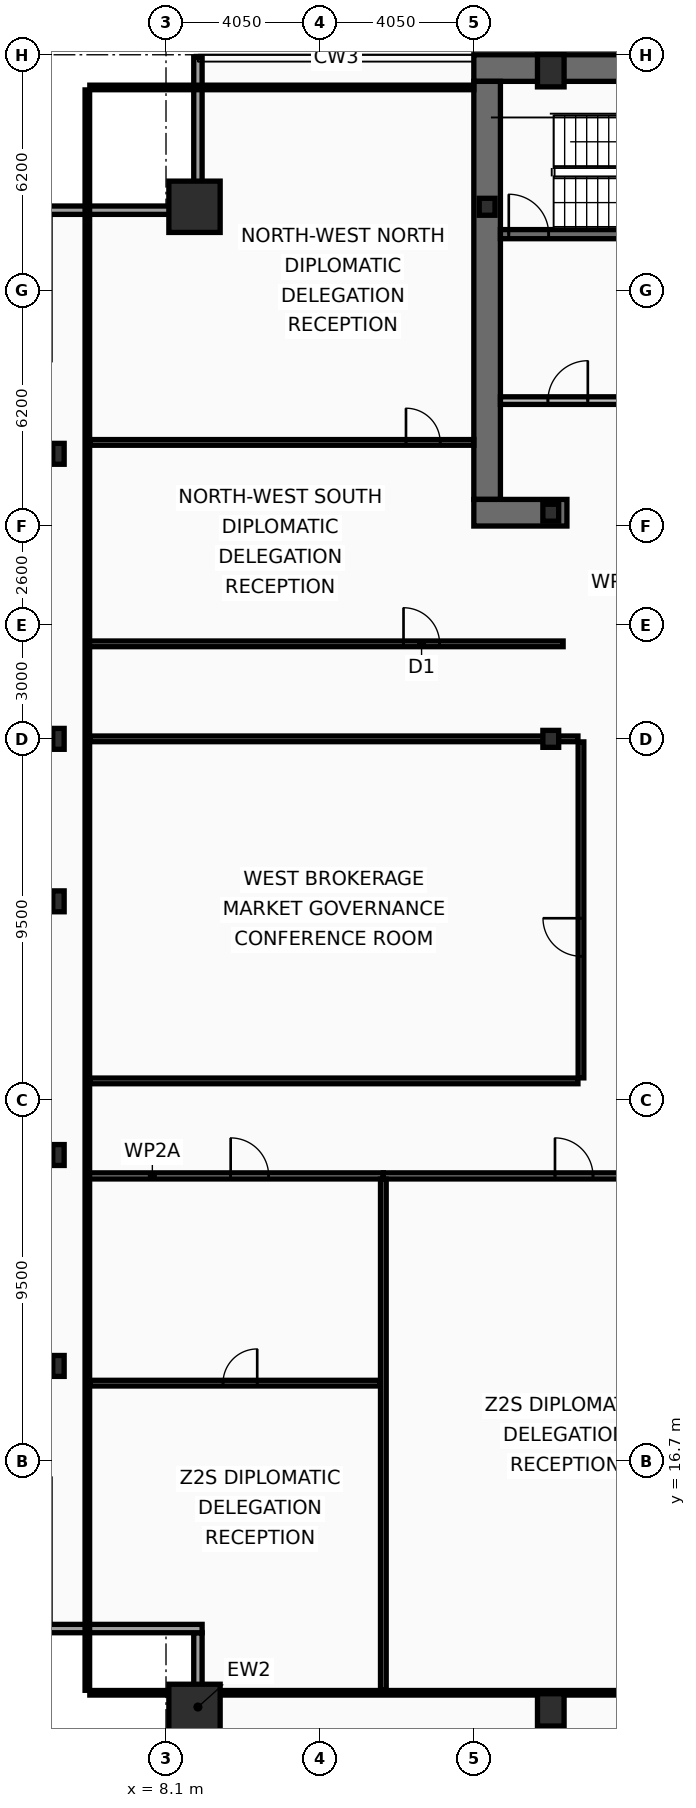
"""IFC4 building model, lengths in metres.
Left out: names, types, materials, properties, quantities, classifications, styles, units other than length and angle.
Written with IfcOpenShell. Run it as: python <this file> out.ifc"""

import sys

from ifc_helpers import new_model, si_unit, direction, frame, frame_2d, origin, origin_2d, place, context, subcontext, project, spatial, rectangle, hollow_rectangle, i_section, extrude, element, fill, save


model = new_model("IFC4")
c1 = context("Model", 3, precision=1e-05, world=origin(), true_north=direction((0.0, 1.0)))
c2 = subcontext(c1, "Body", "Model", "MODEL_VIEW")
j1 = project(units=[si_unit("LENGTHUNIT", "METRE"), si_unit("PLANEANGLEUNIT", "RADIAN")], contexts=[c1])
p1 = place(None, origin())
s1 = spatial("IfcSite", under=j1, at=p1, CompositionType="ELEMENT")
p2 = place(p1, origin())
s2 = spatial("IfcBuilding", under=s1, at=p2, CompositionType="ELEMENT")
p3 = place(p2, frame((0.0, 0.0, 139.8)))
s3 = spatial("IfcBuildingStorey", under=s2, at=p3, CompositionType="ELEMENT", Elevation=139.8)
p4 = place(p3, frame((16.2, 53.35, 0.0), z_axis=(0.0, 0.0, 1.0), x_axis=(1.0, 0.0, 0.0)))
e1 = element("IfcWall", 1, at=p4, inside=s3, PredefinedType="SHEAR", context=c2, shape_type="SweptSolid", body=[
    extrude(rectangle(XDim=40.5, YDim=0.7, at=frame_2d((20.25, 0.0))), origin(), (0.0, 0.0, 1.0), 3.44),
])
p5 = place(p3, frame((16.55, 42.0, 0.0), z_axis=(0.0, 0.0, 1.0), x_axis=(0.0, 1.0, 0.0)))
e2 = element("IfcWall", 2, at=p5, inside=s3, PredefinedType="SHEAR", context=c2, shape_type="SweptSolid", body=[
    extrude(rectangle(XDim=11.0, YDim=0.7, at=frame_2d((5.5, 0.0))), origin(), (0.0, 0.0, 1.0), 3.44),
])
p6 = place(p3, frame((18.65, 41.65, 0.0), z_axis=(0.0, 0.0, 1.0), x_axis=(-1.0, 0.0, 0.0)))
e3 = element("IfcWall", 3, at=p6, inside=s3, PredefinedType="SHEAR", context=c2, shape_type="SweptSolid", body=[
    extrude(rectangle(XDim=2.45, YDim=0.7, at=frame_2d((1.225, 0.0))), origin(), (0.0, 0.0, 1.0), 3.44),
])
p7 = place(p3, frame((16.9, 48.98, 0.0), z_axis=(0.0, 0.0, 1.0), x_axis=(1.0, 0.0, 0.0)))
e4 = element("IfcWall", 4, at=p7, inside=s3, PredefinedType="SHEAR", context=c2, shape_type="SweptSolid", body=[
    extrude(rectangle(XDim=7.32, YDim=0.24, at=frame_2d((3.66, 0.0))), origin(), (0.0, 0.0, 1.0), 3.44),
])
p8 = place(p7, frame((0.22, 0.0, 0.0)))
e5 = element("IfcOpeningElement", 5, at=p8, cuts=e4, PredefinedType="OPENING", context=c2, shape_type="SweptSolid", body=[
    extrude(rectangle(XDim=1.05, YDim=2.15, at=frame_2d((0.525, 1.075))), frame((0.0, 0.13, 0.0), z_axis=(0.0, -1.0, 0.0), x_axis=(1.0, 0.0, 0.0)), (0.0, 0.0, 1.0), 0.26),
])
for number, where, z_axis, x_axis in (
    (6, (8.85, 10.15, 0.0), (0.0, 0.0, 1.0), (1.0, 0.0, 0.0)),
    (7, (8.85, 49.7, 0.0), (0.0, 0.0, 1.0), (1.0, 0.0, 0.0)),
):
    element("IfcColumn", number, at=place(p3, frame(where, z_axis=z_axis, x_axis=x_axis)), inside=s3, PredefinedType="COLUMN", context=c2, shape_type="SweptSolid", body=[
        extrude(hollow_rectangle(XDim=1.35, YDim=1.35, WallThickness=0.065, at=origin_2d()), origin(), (0.0, 0.0, 1.0), 3.6),
    ])
for number, where, z_axis, x_axis in (
    (8, (18.225, 10.15, 0.0), (0.0, 0.0, 1.0), (1.0, 0.0, 0.0)),
    (9, (18.225, 53.28, 0.0), (0.0, 0.0, 1.0), (1.0, 0.0, 0.0)),
):
    element("IfcColumn", number, at=place(p3, frame(where, z_axis=z_axis, x_axis=x_axis)), inside=s3, PredefinedType="COLUMN", context=c2, shape_type="SweptSolid", body=[
        extrude(hollow_rectangle(XDim=0.7, YDim=0.85, WallThickness=0.05, at=origin_2d()), origin(), (0.0, 0.0, 1.0), 3.6),
    ])
for number, where, z_axis, x_axis in (
    (10, (5.27, 19.2, 0.0), (0.0, 0.0, 1.0), (1.0, 0.0, 0.0)),
    (11, (5.27, 24.75, 0.0), (0.0, 0.0, 1.0), (1.0, 0.0, 0.0)),
    (12, (5.27, 31.425, 0.0), (0.0, 0.0, 1.0), (1.0, 0.0, 0.0)),
    (13, (5.27, 35.7, 0.0), (0.0, 0.0, 1.0), (1.0, 0.0, 0.0)),
    (14, (5.27, 43.2, 0.0), (0.0, 0.0, 1.0), (1.0, 0.0, 0.0)),
):
    element("IfcColumn", number, at=place(p3, frame(where, z_axis=z_axis, x_axis=x_axis)), inside=s3, PredefinedType="COLUMN", context=c2, shape_type="SweptSolid", body=[
        extrude(i_section(OverallWidth=0.3, OverallDepth=0.55, WebThickness=0.015, FlangeThickness=0.029, at=origin_2d()), origin(), (0.0, 0.0, 1.0), 3.6),
    ])
for number, where, z_axis, x_axis in (
    (15, (16.55, 49.7, 0.0), (0.0, 0.0, 1.0), (1.0, 0.0, 0.0)),
    (16, (18.225, 35.7, 0.0), (0.0, 0.0, 1.0), (1.0, 0.0, 0.0)),
    (17, (18.225, 41.65, 0.0), (0.0, 0.0, 1.0), (1.0, 0.0, 0.0)),
):
    element("IfcColumn", number, at=place(p3, frame(where, z_axis=z_axis, x_axis=x_axis)), inside=s3, PredefinedType="COLUMN", context=c2, shape_type="SweptSolid", body=[
        extrude(i_section(OverallWidth=0.416, OverallDepth=0.446, WebThickness=0.039, FlangeThickness=0.063, at=origin_2d()), origin(), (0.0, 0.0, 1.0), 3.6),
    ])
p9 = place(p3, frame((8.94, 8.27, 0.0), z_axis=(0.0, 0.0, 1.0), x_axis=(0.0, 1.0, 0.0)))
e18 = element("IfcWall", 18, at=p9, inside=s3, PredefinedType="SOLIDWALL", context=c2, shape_type="SweptSolid", body=[
    extrude(rectangle(XDim=3.91, YDim=0.22, at=frame_2d((1.955, 0.0))), origin(), (0.0, 0.0, 1.0), 2.83),
])
for number, where, z_axis, x_axis in (
    (19, (9.05, 12.29, 0.0), (0.0, 0.0, 1.0), (-1.0, 0.0, 0.0)),
    (20, (4.83, 49.61, 0.0), (0.0, 0.0, 1.0), (1.0, 0.0, 0.0)),
):
    element("IfcWall", number, at=place(p3, frame(where, z_axis=z_axis, x_axis=x_axis)), inside=s3, PredefinedType="SOLIDWALL", context=c2, shape_type="SweptSolid", body=[
        extrude(rectangle(XDim=4.22, YDim=0.22, at=frame_2d((2.11, 0.0))), origin(), (0.0, 0.0, 1.0), 2.83),
    ])
p10 = place(p3, frame((8.94, 49.72, 0.0), z_axis=(0.0, 0.0, 1.0), x_axis=(0.0, 1.0, 0.0)))
e21 = element("IfcWall", 21, at=p10, inside=s3, PredefinedType="SOLIDWALL", context=c2, shape_type="SweptSolid", body=[
    extrude(rectangle(XDim=3.91, YDim=0.22, at=frame_2d((1.955, 0.0))), origin(), (0.0, 0.0, 1.0), 2.83),
])
p11 = place(p3, frame((16.9, 44.6, 0.0), z_axis=(0.0, 0.0, 1.0), x_axis=(1.0, 0.0, 0.0)))
e22 = element("IfcWall", 22, at=p11, inside=s3, PredefinedType="PARTITIONING", context=c2, shape_type="SweptSolid", body=[
    extrude(rectangle(XDim=4.1, YDim=0.2, at=frame_2d((2.05, 0.0))), origin(), (0.0, 0.0, 1.0), 3.44),
])
p12 = place(p11, frame((1.25, 0.0, 0.0)))
e23 = element("IfcOpeningElement", 23, at=p12, cuts=e22, PredefinedType="OPENING", context=c2, shape_type="SweptSolid", body=[
    extrude(rectangle(XDim=1.05, YDim=2.15, at=frame_2d((0.525, 1.075))), frame((0.0, 0.11, 0.0), z_axis=(0.0, -1.0, 0.0), x_axis=(1.0, 0.0, 0.0)), (0.0, 0.0, 1.0), 0.22),
])
p13 = place(p3, frame((6.03, 38.2, 0.0), z_axis=(0.0, 0.0, 1.0), x_axis=(1.0, 0.0, 0.0)))
e24 = element("IfcWall", 24, at=p13, inside=s3, PredefinedType="PARTITIONING", context=c2, shape_type="SweptSolid", body=[
    extrude(rectangle(XDim=12.52, YDim=0.15, at=frame_2d((6.26, 0.0))), origin(), (0.0, 0.0, 1.0), 2.73),
])
p14 = place(p13, frame((8.32, 0.0, 0.0)))
e25 = element("IfcOpeningElement", 25, at=p14, cuts=e24, PredefinedType="OPENING", context=c2, shape_type="SweptSolid", body=[
    extrude(rectangle(XDim=0.95, YDim=2.05, at=frame_2d((0.475, 1.025))), frame((0.0, 0.085, 0.0), z_axis=(0.0, -1.0, 0.0), x_axis=(1.0, 0.0, 0.0)), (0.0, 0.0, 1.0), 0.17),
])
p15 = place(p3, frame((6.095, 43.5, 0.0), z_axis=(0.0, 0.0, 1.0), x_axis=(1.0, 0.0, 0.0)))
e26 = element("IfcWall", 26, at=p15, inside=s3, PredefinedType="PARTITIONING", context=c2, shape_type="SweptSolid", body=[
    extrude(rectangle(XDim=10.105, YDim=0.15, at=frame_2d((5.052, 0.0))), origin(), (0.0, 0.0, 1.0), 2.73),
])
p16 = place(p15, frame((8.32, 0.0, 0.0)))
e27 = element("IfcOpeningElement", 27, at=p16, cuts=e26, PredefinedType="OPENING", context=c2, shape_type="SweptSolid", body=[
    extrude(rectangle(XDim=0.9, YDim=2.05, at=frame_2d((0.45, 1.025))), frame((0.0, 0.085, 0.0), z_axis=(0.0, -1.0, 0.0), x_axis=(1.0, 0.0, 0.0)), (0.0, 0.0, 1.0), 0.17),
])
p17 = place(p3, frame((6.03, 24.2, 0.0), z_axis=(0.0, 0.0, 1.0), x_axis=(1.0, 0.0, 0.0)))
e28 = element("IfcWall", 28, at=p17, inside=s3, PredefinedType="PARTITIONING", context=c2, shape_type="SweptSolid", body=[
    extrude(rectangle(XDim=7.789, YDim=0.16, at=frame_2d((3.895, 0.0))), origin(), (0.0, 0.0, 1.0), 3.44),
])
p18 = place(p17, frame((3.771, 0.0, 0.0)))
e29 = element("IfcOpeningElement", 29, at=p18, cuts=e28, PredefinedType="OPENING", context=c2, shape_type="SweptSolid", body=[
    extrude(rectangle(XDim=1.0, YDim=2.05, at=frame_2d((0.5, 1.025))), frame((0.0, 0.09, 0.0), z_axis=(0.0, -1.0, 0.0), x_axis=(1.0, 0.0, 0.0)), (0.0, 0.0, 1.0), 0.18),
])
p19 = place(p3, frame((6.095, 18.747, 0.0), z_axis=(0.0, 0.0, 1.0), x_axis=(1.0, 0.0, 0.0)))
e30 = element("IfcWall", 30, at=p19, inside=s3, PredefinedType="PARTITIONING", context=c2, shape_type="SweptSolid", body=[
    extrude(rectangle(XDim=7.644, YDim=0.15, at=frame_2d((3.822, 0.0))), origin(), (0.0, 0.0, 1.0), 2.73),
])
p20 = place(p19, frame((3.505, 0.0, 0.0)))
e31 = element("IfcOpeningElement", 31, at=p20, cuts=e30, PredefinedType="OPENING", context=c2, shape_type="SweptSolid", body=[
    extrude(rectangle(XDim=0.9, YDim=2.05, at=frame_2d((0.45, 1.025))), frame((0.0, 0.085, 0.0), z_axis=(0.0, -1.0, 0.0), x_axis=(1.0, 0.0, 0.0)), (0.0, 0.0, 1.0), 0.17),
])
p21 = place(p3, frame((13.819, 24.2, 0.0), z_axis=(0.0, 0.0, 1.0), x_axis=(1.0, 0.0, 0.0)))
e32 = element("IfcWall", 32, at=p21, inside=s3, PredefinedType="PARTITIONING", context=c2, shape_type="SweptSolid", body=[
    extrude(rectangle(XDim=9.563, YDim=0.16, at=frame_2d((4.781, 0.0))), origin(), (0.0, 0.0, 1.0), 2.73),
])
p22 = place(p21, frame((4.516, 0.0, 0.0)))
e33 = element("IfcOpeningElement", 33, at=p22, cuts=e32, PredefinedType="OPENING", context=c2, shape_type="SweptSolid", body=[
    extrude(rectangle(XDim=1.0, YDim=2.05, at=frame_2d((0.5, 1.025))), frame((0.0, 0.09, 0.0), z_axis=(0.0, -1.0, 0.0), x_axis=(1.0, 0.0, 0.0)), (0.0, 0.0, 1.0), 0.18),
])
p23 = place(p3, frame((13.819, 10.665, 0.0), z_axis=(0.0, 0.0, 1.0), x_axis=(0.0, 1.0, 0.0)))
e34 = element("IfcWall", 34, at=p23, inside=s3, PredefinedType="PARTITIONING", context=c2, shape_type="SweptSolid", body=[
    extrude(rectangle(XDim=13.45, YDim=0.15, at=frame_2d((6.725, 0.0))), origin(), (0.0, 0.0, 1.0), 2.73),
])
p24 = place(p3, frame((19.02, 26.78, 0.0), z_axis=(0.0, 0.0, 1.0), x_axis=(0.0, 1.0, 0.0)))
e35 = element("IfcWall", 35, at=p24, inside=s3, PredefinedType="PARTITIONING", context=c2, shape_type="SweptSolid", body=[
    extrude(rectangle(XDim=8.84, YDim=0.15, at=frame_2d((4.42, 0.0))), origin(), (0.0, 0.0, 1.0), 2.93),
])
p25 = place(p24, frame((3.2, 0.0, 0.0)))
e36 = element("IfcOpeningElement", 36, at=p25, cuts=e35, PredefinedType="OPENING", context=c2, shape_type="SweptSolid", body=[
    extrude(rectangle(XDim=1.0, YDim=2.05, at=frame_2d((0.5, 1.025))), frame((0.0, 0.085, 0.0), z_axis=(0.0, -1.0, 0.0), x_axis=(1.0, 0.0, 0.0)), (0.0, 0.0, 1.0), 0.17),
])
for number, where, z_axis, x_axis in (
    (37, (6.095, 26.7, 0.0), (0.0, 0.0, 1.0), (1.0, 0.0, 0.0)),
    (38, (6.095, 35.7, 0.0), (0.0, 0.0, 1.0), (1.0, 0.0, 0.0)),
):
    element("IfcWall", number, at=place(p3, frame(where, z_axis=z_axis, x_axis=x_axis)), inside=s3, PredefinedType="PARTITIONING", context=c2, shape_type="SweptSolid", body=[
        extrude(rectangle(XDim=12.845, YDim=0.15, at=frame_2d((6.422, 0.0))), origin(), (0.0, 0.0, 1.0), 2.73),
    ])
p26 = place(p3, frame((6.03, 10.665, 0.0), z_axis=(0.0, 0.0, 1.0), x_axis=(0.0, 1.0, 0.0)))
e39 = element("IfcWall", 39, at=p26, inside=s3, PredefinedType="PARTITIONING", context=c2, shape_type="SweptSolid", body=[
    extrude(rectangle(XDim=42.11, YDim=0.12, at=frame_2d((21.055, 0.0))), origin(), (0.0, 0.0, 1.0), 2.73),
])
p27 = place(p3, frame((6.095, 52.84, 0.0), z_axis=(0.0, 0.0, 1.0), x_axis=(1.0, 0.0, 0.0)))
e40 = element("IfcWall", 40, at=p27, inside=s3, PredefinedType="PARTITIONING", context=c2, shape_type="SweptSolid", body=[
    extrude(rectangle(XDim=10.105, YDim=0.12, at=frame_2d((5.052, 0.0))), origin(), (0.0, 0.0, 1.0), 3.44),
])
p28 = place(p3, frame((6.095, 10.6, 0.0), z_axis=(0.0, 0.0, 1.0), x_axis=(1.0, 0.0, 0.0)))
e41 = element("IfcWall", 41, at=p28, inside=s3, PredefinedType="PARTITIONING", context=c2, shape_type="SweptSolid", body=[
    extrude(rectangle(XDim=60.71, YDim=0.12, at=frame_2d((30.355, 0.0))), origin(), (0.0, 0.0, 1.0), 2.73),
])
p29 = place(p8, origin())
e42 = element("IfcDoor", 42, at=p29, inside=s3, OperationType="SINGLE_SWING_LEFT", PredefinedType="DOOR", context=c2, shape_type="SweptSolid", body=[
    extrude(rectangle(XDim=1.05, YDim=2.15, at=frame_2d((0.525, 1.075))), frame((0.0, 0.025, 0.0), z_axis=(0.0, -1.0, 0.0), x_axis=(1.0, 0.0, 0.0)), (0.0, 0.0, 1.0), 0.05),
])
fill(e5, e42)
p30 = place(p12, origin())
e43 = element("IfcDoor", 43, at=p30, inside=s3, OperationType="SINGLE_SWING_RIGHT", PredefinedType="DOOR", context=c2, shape_type="SweptSolid", body=[
    extrude(rectangle(XDim=1.05, YDim=2.15, at=frame_2d((0.525, 1.075))), frame((0.0, 0.025, 0.0), z_axis=(0.0, -1.0, 0.0), x_axis=(1.0, 0.0, 0.0)), (0.0, 0.0, 1.0), 0.05),
])
fill(e23, e43)
p31 = place(p14, origin())
e44 = element("IfcDoor", 44, at=p31, inside=s3, OperationType="SINGLE_SWING_LEFT", PredefinedType="DOOR", context=c2, shape_type="SweptSolid", body=[
    extrude(rectangle(XDim=0.95, YDim=2.05, at=frame_2d((0.475, 1.025))), frame((0.0, 0.025, 0.0), z_axis=(0.0, -1.0, 0.0), x_axis=(1.0, 0.0, 0.0)), (0.0, 0.0, 1.0), 0.05),
])
fill(e25, e44)
p32 = place(p16, origin())
e45 = element("IfcDoor", 45, at=p32, inside=s3, OperationType="SINGLE_SWING_LEFT", PredefinedType="DOOR", context=c2, shape_type="SweptSolid", body=[
    extrude(rectangle(XDim=0.9, YDim=2.05, at=frame_2d((0.45, 1.025))), frame((0.0, 0.025, 0.0), z_axis=(0.0, -1.0, 0.0), x_axis=(1.0, 0.0, 0.0)), (0.0, 0.0, 1.0), 0.05),
])
fill(e27, e45)
p33 = place(p18, origin())
e46 = element("IfcDoor", 46, at=p33, inside=s3, OperationType="SINGLE_SWING_LEFT", PredefinedType="DOOR", context=c2, shape_type="SweptSolid", body=[
    extrude(rectangle(XDim=1.0, YDim=2.05, at=frame_2d((0.5, 1.025))), frame((0.0, 0.025, 0.0), z_axis=(0.0, -1.0, 0.0), x_axis=(1.0, 0.0, 0.0)), (0.0, 0.0, 1.0), 0.05),
])
fill(e29, e46)
p34 = place(p20, origin())
e47 = element("IfcDoor", 47, at=p34, inside=s3, OperationType="SINGLE_SWING_RIGHT", PredefinedType="DOOR", context=c2, shape_type="SweptSolid", body=[
    extrude(rectangle(XDim=0.9, YDim=2.05, at=frame_2d((0.45, 1.025))), frame((0.0, 0.025, 0.0), z_axis=(0.0, -1.0, 0.0), x_axis=(1.0, 0.0, 0.0)), (0.0, 0.0, 1.0), 0.05),
])
fill(e31, e47)
p35 = place(p22, origin())
e48 = element("IfcDoor", 48, at=p35, inside=s3, OperationType="SINGLE_SWING_LEFT", PredefinedType="DOOR", context=c2, shape_type="SweptSolid", body=[
    extrude(rectangle(XDim=1.0, YDim=2.05, at=frame_2d((0.5, 1.025))), frame((0.0, 0.025, 0.0), z_axis=(0.0, -1.0, 0.0), x_axis=(1.0, 0.0, 0.0)), (0.0, 0.0, 1.0), 0.05),
])
fill(e33, e48)
p36 = place(p25, origin())
e49 = element("IfcDoor", 49, at=p36, inside=s3, OperationType="SINGLE_SWING_RIGHT", PredefinedType="DOOR", context=c2, shape_type="SweptSolid", body=[
    extrude(rectangle(XDim=1.0, YDim=2.05, at=frame_2d((0.5, 1.025))), frame((0.0, 0.025, 0.0), z_axis=(0.0, -1.0, 0.0), x_axis=(1.0, 0.0, 0.0)), (0.0, 0.0, 1.0), 0.05),
])
fill(e36, e49)
save(model, sys.argv[1])
